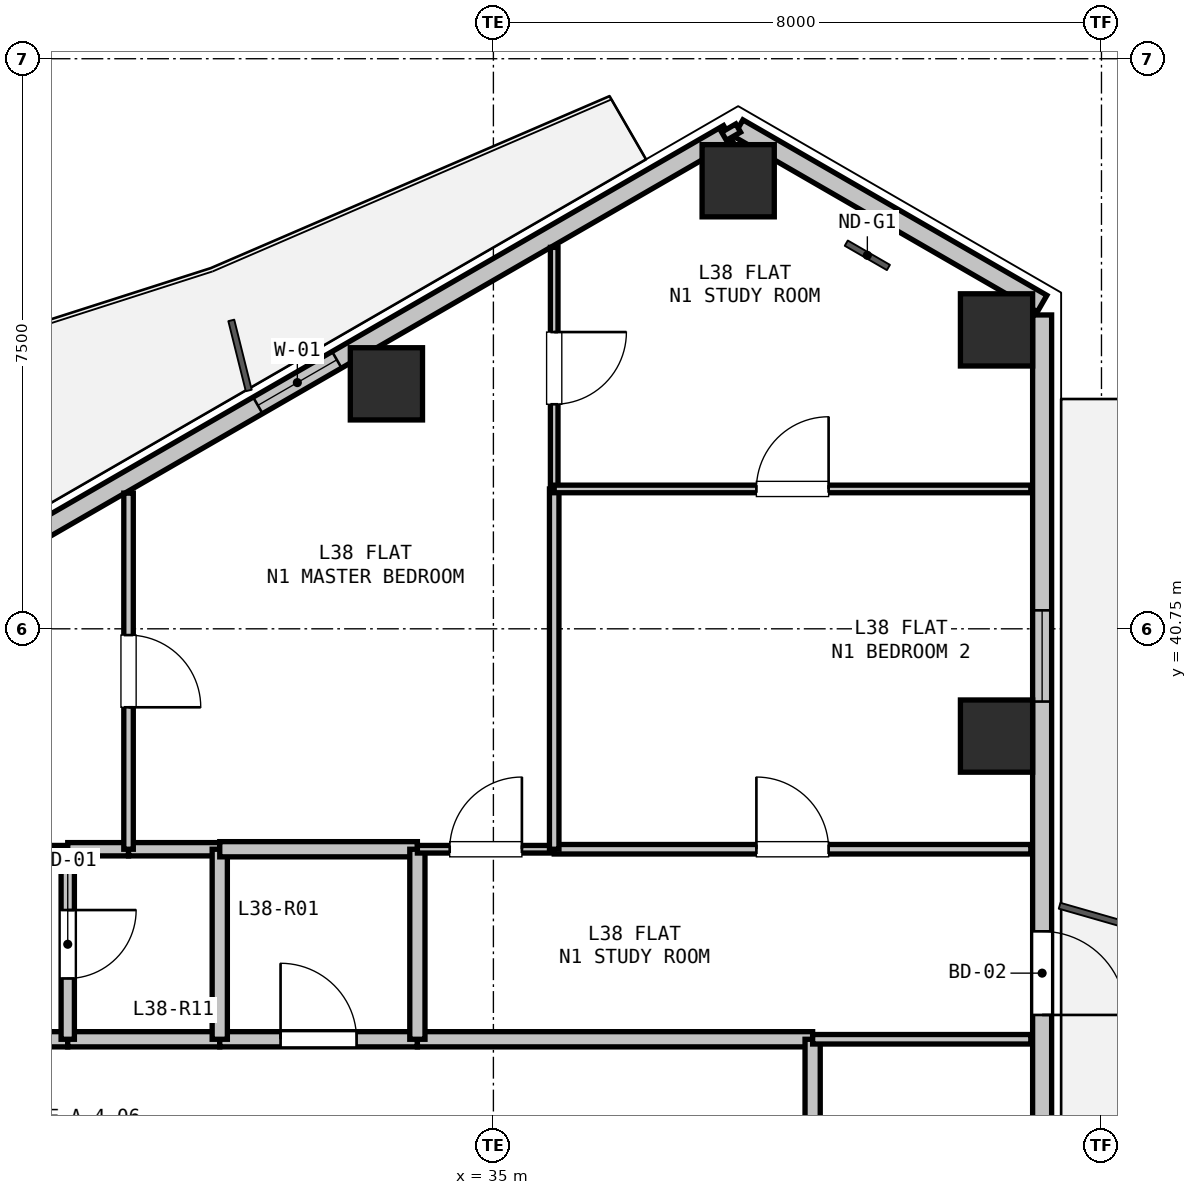
"""IFC4 building model, lengths in metres.
Left out: names, types, materials, properties, quantities, classifications, styles, units other than length and angle.
Written with IfcOpenShell. Run it as: python <this file> out.ifc"""

import sys

from ifc_helpers import new_model, si_unit, direction, frame, frame_2d, origin, origin_2d, place, context, subcontext, project, spatial, rectangle, hollow_rectangle, extrude, element, fill, save


model = new_model("IFC4")
c1 = context("Model", 3, precision=1e-05, world=origin(), true_north=direction((0.0, 1.0)))
c2 = subcontext(c1, "Body", "Model", "MODEL_VIEW")
j1 = project(units=[si_unit("LENGTHUNIT", "METRE"), si_unit("PLANEANGLEUNIT", "RADIAN")], contexts=[c1])
p1 = place(None, origin())
s1 = spatial("IfcSite", under=j1, at=p1, CompositionType="ELEMENT")
p2 = place(p1, origin())
s2 = spatial("IfcBuilding", under=s1, at=p2, CompositionType="ELEMENT")
p3 = place(p2, frame((0.0, 0.0, 137.7)))
s3 = spatial("IfcBuildingStorey", under=s2, at=p3, CompositionType="ELEMENT", Elevation=137.7)
for number, where, z_axis, x_axis in (
    (1, (33.593, 43.973, 0.0), (0.0, 0.0, 1.0), (1.0, 0.0, 0.0)),
    (2, (38.22, 46.645, 0.0), (0.0, 0.0, 1.0), (1.0, 0.0, 0.0)),
    (3, (41.619, 44.683, 0.0), (0.0, 0.0, 1.0), (1.0, 0.0, 0.0)),
    (4, (41.619, 39.339, 0.0), (0.0, 0.0, 1.0), (1.0, 0.0, 0.0)),
):
    element("IfcColumn", number, at=place(p3, frame(where, z_axis=z_axis, x_axis=x_axis)), inside=s3, PredefinedType="COLUMN", context=c2, shape_type="SweptSolid", body=[
        extrude(hollow_rectangle(XDim=0.95, YDim=0.95, WallThickness=0.028, at=origin_2d()), origin(), (0.0, 0.0, 1.0), 3.3),
    ])
p4 = place(p3, frame((38.22, 47.338, 0.0), z_axis=(0.0, 0.0, 1.0), x_axis=(0.866035021055, -0.499983342029, 0.0)))
e5 = element("IfcWall", 5, at=p4, inside=s3, PredefinedType="SOLIDWALL", context=c2, shape_type="SweptSolid", body=[
    extrude(rectangle(XDim=4.617, YDim=0.25, at=frame_2d((2.309, 0.0))), origin(), (0.0, 0.0, 1.0), 2.68),
])
p5 = place(p3, frame((28.403, 41.67, 0.0), z_axis=(0.0, 0.0, 1.0), x_axis=(0.86602239209, 0.500005216371, 0.0)))
e6 = element("IfcWall", 6, at=p5, inside=s3, PredefinedType="SOLIDWALL", context=c2, shape_type="SweptSolid", body=[
    extrude(rectangle(XDim=11.186, YDim=0.25, at=frame_2d((5.593, 0.0))), origin(), (0.0, 0.0, 1.0), 2.68),
])
p6 = place(p5, frame((4.039, 0.0, 0.9)))
e7 = element("IfcOpeningElement", 7, at=p6, cuts=e6, PredefinedType="OPENING", context=c2, shape_type="SweptSolid", body=[
    extrude(rectangle(XDim=1.2, YDim=1.4, at=frame_2d((0.6, 0.7))), frame((0.0, 0.135, 0.0), z_axis=(0.0, -1.0, 0.0), x_axis=(1.0, 0.0, 0.0)), (0.0, 0.0, 1.0), 0.27),
])
p7 = place(p3, frame((42.219, 44.879, 0.0), z_axis=(0.0, 0.0, 1.0), x_axis=(0.0, -1.0, 0.0)))
e8 = element("IfcWall", 8, at=p7, inside=s3, PredefinedType="SOLIDWALL", context=c2, shape_type="SweptSolid", body=[
    extrude(rectangle(XDim=11.186, YDim=0.25, at=frame_2d((5.593, 0.0))), origin(), (0.0, 0.0, 1.0), 2.68),
])
p8 = place(p7, frame((8.109, 0.0, 0.0)))
e9 = element("IfcOpeningElement", 9, at=p8, cuts=e8, PredefinedType="OPENING", context=c2, shape_type="SweptSolid", body=[
    extrude(rectangle(XDim=1.1, YDim=2.1, at=frame_2d((0.55, 1.05))), frame((0.0, 0.135, 0.0), z_axis=(0.0, -1.0, 0.0), x_axis=(1.0, 0.0, 0.0)), (0.0, 0.0, 1.0), 0.27),
])
p9 = place(p7, frame((3.886, 0.0, 0.9)))
e10 = element("IfcOpeningElement", 10, at=p9, cuts=e8, PredefinedType="OPENING", context=c2, shape_type="SweptSolid", body=[
    extrude(rectangle(XDim=1.2, YDim=1.4, at=frame_2d((0.6, 0.7))), frame((0.0, 0.135, 0.0), z_axis=(0.0, -1.0, 0.0), x_axis=(1.0, 0.0, 0.0)), (0.0, 0.0, 1.0), 0.27),
])
p10 = place(p3, frame((26.8, 35.35, 0.0), z_axis=(0.0, 0.0, 1.0), x_axis=(1.0, 0.0, 0.0)))
e11 = element("IfcWall", 11, at=p10, inside=s3, PredefinedType="PARTITIONING", context=c2, shape_type="SweptSolid", body=[
    extrude(rectangle(XDim=2.6, YDim=0.2, at=frame_2d((1.3, 0.0))), origin(), (0.0, 0.0, 1.0), 3.06),
])
p11 = place(p10, frame((0.8, 0.0, 0.0)))
e12 = element("IfcOpeningElement", 12, at=p11, cuts=e11, PredefinedType="OPENING", context=c2, shape_type="SweptSolid", body=[
    extrude(rectangle(XDim=1.0, YDim=2.15, at=frame_2d((0.5, 1.075))), frame((0.0, 0.11, 0.0), z_axis=(0.0, -1.0, 0.0), x_axis=(1.0, 0.0, 0.0)), (0.0, 0.0, 1.0), 0.22),
])
p12 = place(p3, frame((29.4, 35.35, 0.0), z_axis=(0.0, 0.0, 1.0), x_axis=(1.0, 0.0, 0.0)))
e13 = element("IfcWall", 13, at=p12, inside=s3, PredefinedType="PARTITIONING", context=c2, shape_type="SweptSolid", body=[
    extrude(rectangle(XDim=2.0, YDim=0.2, at=frame_2d((1.0, 0.0))), origin(), (0.0, 0.0, 1.0), 3.06),
])
p13 = place(p3, frame((31.4, 35.35, 0.0), z_axis=(0.0, 0.0, 1.0), x_axis=(1.0, 0.0, 0.0)))
e14 = element("IfcWall", 14, at=p13, inside=s3, PredefinedType="PARTITIONING", context=c2, shape_type="SweptSolid", body=[
    extrude(rectangle(XDim=2.6, YDim=0.2, at=frame_2d((1.3, 0.0))), origin(), (0.0, 0.0, 1.0), 3.06),
])
p14 = place(p13, frame((0.8, 0.0, 0.0)))
e15 = element("IfcOpeningElement", 15, at=p14, cuts=e14, PredefinedType="OPENING", context=c2, shape_type="SweptSolid", body=[
    extrude(rectangle(XDim=1.0, YDim=2.15, at=frame_2d((0.5, 1.075))), frame((0.0, 0.11, 0.0), z_axis=(0.0, -1.0, 0.0), x_axis=(1.0, 0.0, 0.0)), (0.0, 0.0, 1.0), 0.22),
])
p15 = place(p3, frame((34.0, 35.35, 0.0), z_axis=(0.0, 0.0, 1.0), x_axis=(1.0, 0.0, 0.0)))
e16 = element("IfcWall", 16, at=p15, inside=s3, PredefinedType="PARTITIONING", context=c2, shape_type="SweptSolid", body=[
    extrude(rectangle(XDim=5.2, YDim=0.2, at=frame_2d((2.6, 0.0))), origin(), (0.0, 0.0, 1.0), 2.433),
])
p16 = place(p3, frame((39.2, 35.35, 0.0), z_axis=(0.0, 0.0, 1.0), x_axis=(0.0, -1.0, 0.0)))
e17 = element("IfcWall", 17, at=p16, inside=s3, PredefinedType="PARTITIONING", context=c2, shape_type="SweptSolid", body=[
    extrude(rectangle(XDim=1.75, YDim=0.2, at=frame_2d((0.875, 0.0))), origin(), (0.0, 0.0, 1.0), 3.06),
])
p17 = place(p3, frame((26.8, 37.85, 0.0), z_axis=(0.0, 0.0, 1.0), x_axis=(1.0, 0.0, 0.0)))
e18 = element("IfcWall", 18, at=p17, inside=s3, PredefinedType="PARTITIONING", context=c2, shape_type="SweptSolid", body=[
    extrude(rectangle(XDim=2.6, YDim=0.1, at=frame_2d((1.3, 0.0))), origin(), (0.0, 0.0, 1.0), 3.06),
])
p18 = place(p17, frame((0.825, 0.0, 0.0)))
e19 = element("IfcOpeningElement", 19, at=p18, cuts=e18, PredefinedType="OPENING", context=c2, shape_type="SweptSolid", body=[
    extrude(rectangle(XDim=0.95, YDim=2.1, at=frame_2d((0.475, 1.05))), frame((0.0, 0.06, 0.0), z_axis=(0.0, -1.0, 0.0), x_axis=(1.0, 0.0, 0.0)), (0.0, 0.0, 1.0), 0.12),
])
p19 = place(p3, frame((29.4, 37.85, 0.0), z_axis=(0.0, 0.0, 1.0), x_axis=(0.0, -1.0, 0.0)))
e20 = element("IfcWall", 20, at=p19, inside=s3, PredefinedType="PLUMBINGWALL", context=c2, shape_type="SweptSolid", body=[
    extrude(rectangle(XDim=2.5, YDim=0.175, at=frame_2d((1.25, 0.0))), origin(), (0.0, 0.0, 1.0), 3.06),
])
p20 = place(p19, frame((0.8, 0.0, 0.0)))
e21 = element("IfcOpeningElement", 21, at=p20, cuts=e20, PredefinedType="OPENING", context=c2, shape_type="SweptSolid", body=[
    extrude(rectangle(XDim=0.9, YDim=2.1, at=frame_2d((0.45, 1.05))), frame((0.0, 0.097, 0.0), z_axis=(0.0, -1.0, 0.0), x_axis=(1.0, 0.0, 0.0)), (0.0, 0.0, 1.0), 0.195),
])
p21 = place(p3, frame((29.4, 37.85, 0.0), z_axis=(0.0, 0.0, 1.0), x_axis=(1.0, 0.0, 0.0)))
e22 = element("IfcWall", 22, at=p21, inside=s3, PredefinedType="PLUMBINGWALL", context=c2, shape_type="SweptSolid", body=[
    extrude(rectangle(XDim=0.8, YDim=0.175, at=frame_2d((0.4, 0.0))), origin(), (0.0, 0.0, 1.0), 3.06),
])
p22 = place(p3, frame((30.2, 37.85, 0.0), z_axis=(0.0, 0.0, 1.0), x_axis=(1.0, 0.0, 0.0)))
e23 = element("IfcWall", 23, at=p22, inside=s3, PredefinedType="PLUMBINGWALL", context=c2, shape_type="SweptSolid", body=[
    extrude(rectangle(XDim=1.2, YDim=0.175, at=frame_2d((0.6, 0.0))), origin(), (0.0, 0.0, 1.0), 3.06),
])
p23 = place(p3, frame((31.4, 37.85, 0.0), z_axis=(0.0, 0.0, 1.0), x_axis=(0.0, -1.0, 0.0)))
e24 = element("IfcWall", 24, at=p23, inside=s3, PredefinedType="PARTITIONING", context=c2, shape_type="SweptSolid", body=[
    extrude(rectangle(XDim=2.5, YDim=0.2, at=frame_2d((1.25, 0.0))), origin(), (0.0, 0.0, 1.0), 3.06),
])
p24 = place(p3, frame((31.4, 37.85, 0.0), z_axis=(0.0, 0.0, 1.0), x_axis=(1.0, 0.0, 0.0)))
e25 = element("IfcWall", 25, at=p24, inside=s3, PredefinedType="PARTITIONING", context=c2, shape_type="SweptSolid", body=[
    extrude(rectangle(XDim=2.6, YDim=0.2, at=frame_2d((1.3, 0.0))), origin(), (0.0, 0.0, 1.0), 3.06),
])
p25 = place(p3, frame((34.0, 37.85, 0.0), z_axis=(0.0, 0.0, 1.0), x_axis=(0.0, -1.0, 0.0)))
e26 = element("IfcWall", 26, at=p25, inside=s3, PredefinedType="PARTITIONING", context=c2, shape_type="SweptSolid", body=[
    extrude(rectangle(XDim=2.5, YDim=0.2, at=frame_2d((1.25, 0.0))), origin(), (0.0, 0.0, 1.0), 3.06),
])
p26 = place(p3, frame((42.07, 35.35, 0.0), z_axis=(0.0, 0.0, 1.0), x_axis=(-1.0, 0.0, 0.0)))
e27 = element("IfcWall", 27, at=p26, inside=s3, PredefinedType="PARTITIONING", context=c2, shape_type="SweptSolid", body=[
    extrude(rectangle(XDim=2.87, YDim=0.125, at=frame_2d((1.435, 0.0))), origin(), (0.0, 0.0, 1.0), 2.365),
])
p27 = place(p3, frame((34.0, 37.85, 0.0), z_axis=(0.0, 0.0, 1.0), x_axis=(1.0, 0.0, 0.0)))
e28 = element("IfcWall", 28, at=p27, inside=s3, PredefinedType="PARTITIONING", context=c2, shape_type="SweptSolid", body=[
    extrude(rectangle(XDim=1.8, YDim=0.1, at=frame_2d((0.9, 0.0))), origin(), (0.0, 0.0, 1.0), 3.06),
])
p28 = place(p27, frame((0.425, 0.0, 0.0)))
e29 = element("IfcOpeningElement", 29, at=p28, cuts=e28, PredefinedType="OPENING", context=c2, shape_type="SweptSolid", body=[
    extrude(rectangle(XDim=0.95, YDim=2.1, at=frame_2d((0.475, 1.05))), frame((0.0, 0.06, 0.0), z_axis=(0.0, -1.0, 0.0), x_axis=(1.0, 0.0, 0.0)), (0.0, 0.0, 1.0), 0.12),
])
p29 = place(p3, frame((35.8, 37.85, 0.0), z_axis=(0.0, 0.0, 1.0), x_axis=(1.0, 0.0, 0.0)))
e30 = element("IfcWall", 30, at=p29, inside=s3, PredefinedType="PARTITIONING", context=c2, shape_type="SweptSolid", body=[
    extrude(rectangle(XDim=6.27, YDim=0.125, at=frame_2d((3.135, 0.0))), origin(), (0.0, 0.0, 1.0), 2.365),
])
p30 = place(p29, frame((2.66, 0.0, 0.0)))
e31 = element("IfcOpeningElement", 31, at=p30, cuts=e30, PredefinedType="OPENING", context=c2, shape_type="SweptSolid", body=[
    extrude(rectangle(XDim=0.95, YDim=2.1, at=frame_2d((0.475, 1.05))), frame((0.0, 0.073, 0.0), z_axis=(0.0, -1.0, 0.0), x_axis=(1.0, 0.0, 0.0)), (0.0, 0.0, 1.0), 0.145),
])
p31 = place(p3, frame((30.2, 42.535, 0.0), z_axis=(0.0, 0.0, 1.0), x_axis=(0.0, -1.0, 0.0)))
e32 = element("IfcWall", 32, at=p31, inside=s3, PredefinedType="PARTITIONING", context=c2, shape_type="SweptSolid", body=[
    extrude(rectangle(XDim=4.685, YDim=0.125, at=frame_2d((2.342, 0.0))), origin(), (0.0, 0.0, 1.0), 2.365),
])
p32 = place(p31, frame((1.867, 0.0, 0.0)))
e33 = element("IfcOpeningElement", 33, at=p32, cuts=e32, PredefinedType="OPENING", context=c2, shape_type="SweptSolid", body=[
    extrude(rectangle(XDim=0.95, YDim=2.1, at=frame_2d((0.475, 1.05))), frame((0.0, 0.073, 0.0), z_axis=(0.0, -1.0, 0.0), x_axis=(1.0, 0.0, 0.0)), (0.0, 0.0, 1.0), 0.145),
])
p33 = place(p3, frame((35.8, 45.768, 0.0), z_axis=(0.0, 0.0, 1.0), x_axis=(0.0, -1.0, 0.0)))
e34 = element("IfcWall", 34, at=p33, inside=s3, PredefinedType="PARTITIONING", context=c2, shape_type="SweptSolid", body=[
    extrude(rectangle(XDim=3.178, YDim=0.1, at=frame_2d((1.589, 0.0))), origin(), (0.0, 0.0, 1.0), 2.725),
])
p34 = place(p33, frame((1.114, 0.0, 0.0)))
e35 = element("IfcOpeningElement", 35, at=p34, cuts=e34, PredefinedType="OPENING", context=c2, shape_type="SweptSolid", body=[
    extrude(rectangle(XDim=0.95, YDim=2.1, at=frame_2d((0.475, 1.05))), frame((0.0, 0.06, 0.0), z_axis=(0.0, -1.0, 0.0), x_axis=(1.0, 0.0, 0.0)), (0.0, 0.0, 1.0), 0.12),
])
p35 = place(p3, frame((35.8, 42.59, 0.0), z_axis=(0.0, 0.0, 1.0), x_axis=(0.0, -1.0, 0.0)))
e36 = element("IfcWall", 36, at=p35, inside=s3, PredefinedType="PARTITIONING", context=c2, shape_type="SweptSolid", body=[
    extrude(rectangle(XDim=4.74, YDim=0.125, at=frame_2d((2.37, 0.0))), origin(), (0.0, 0.0, 1.0), 3.06),
])
p36 = place(p3, frame((35.8, 42.59, 0.0), z_axis=(0.0, 0.0, 1.0), x_axis=(1.0, 0.0, 0.0)))
e37 = element("IfcWall", 37, at=p36, inside=s3, PredefinedType="PARTITIONING", context=c2, shape_type="SweptSolid", body=[
    extrude(rectangle(XDim=6.27, YDim=0.1, at=frame_2d((3.135, 0.0))), origin(), (0.0, 0.0, 1.0), 2.433),
])
p37 = place(p36, frame((2.66, 0.0, 0.0)))
e38 = element("IfcOpeningElement", 38, at=p37, cuts=e37, PredefinedType="OPENING", context=c2, shape_type="SweptSolid", body=[
    extrude(rectangle(XDim=0.95, YDim=2.1, at=frame_2d((0.475, 1.05))), frame((0.0, 0.06, 0.0), z_axis=(0.0, -1.0, 0.0), x_axis=(1.0, 0.0, 0.0)), (0.0, 0.0, 1.0), 0.12),
])
p38 = place(p3, frame((38.034, 47.23, 0.0), z_axis=(0.0, 0.0, 1.0), x_axis=(0.865581379588, 0.500768285049, 0.0)))
e39 = element("IfcWall", 39, at=p38, inside=s3, PredefinedType="PARTITIONING", context=c2, shape_type="SweptSolid", body=[
    extrude(rectangle(XDim=0.216, YDim=0.125, at=frame_2d((0.108, 0.0))), origin(), (0.0, 0.0, 1.0), 3.06),
])
p39 = place(p6, origin())
e40 = element("IfcWindow", 40, at=p39, inside=s3, PartitioningType="SINGLE_PANEL", PredefinedType="WINDOW", context=c2, shape_type="SweptSolid", body=[
    extrude(rectangle(XDim=1.2, YDim=1.4, at=frame_2d((0.6, 0.7))), frame((0.0, 0.03, 0.0), z_axis=(0.0, -1.0, 0.0), x_axis=(1.0, 0.0, 0.0)), (0.0, 0.0, 1.0), 0.06),
])
fill(e7, e40)
p40 = place(p8, origin())
e41 = element("IfcDoor", 41, at=p40, inside=s3, OperationType="SINGLE_SWING_RIGHT", PredefinedType="DOOR", context=c2, shape_type="SweptSolid", body=[
    extrude(rectangle(XDim=1.1, YDim=2.1, at=frame_2d((0.55, 1.05))), frame((0.0, 0.025, 0.0), z_axis=(0.0, -1.0, 0.0), x_axis=(1.0, 0.0, 0.0)), (0.0, 0.0, 1.0), 0.05),
])
fill(e9, e41)
p41 = place(p9, origin())
e42 = element("IfcWindow", 42, at=p41, inside=s3, PartitioningType="SINGLE_PANEL", PredefinedType="WINDOW", context=c2, shape_type="SweptSolid", body=[
    extrude(rectangle(XDim=1.2, YDim=1.4, at=frame_2d((0.6, 0.7))), frame((0.0, 0.03, 0.0), z_axis=(0.0, -1.0, 0.0), x_axis=(1.0, 0.0, 0.0)), (0.0, 0.0, 1.0), 0.06),
])
fill(e10, e42)
p42 = place(p14, origin())
e43 = element("IfcDoor", 43, at=p42, inside=s3, OperationType="SINGLE_SWING_LEFT", PredefinedType="DOOR", context=c2, shape_type="SweptSolid", body=[
    extrude(rectangle(XDim=1.0, YDim=2.15, at=frame_2d((0.5, 1.075))), frame((0.0, 0.025, 0.0), z_axis=(0.0, -1.0, 0.0), x_axis=(1.0, 0.0, 0.0)), (0.0, 0.0, 1.0), 0.05),
])
fill(e15, e43)
p43 = place(p20, origin())
e44 = element("IfcDoor", 44, at=p43, inside=s3, OperationType="SINGLE_SWING_LEFT", PredefinedType="DOOR", context=c2, shape_type="SweptSolid", body=[
    extrude(rectangle(XDim=0.9, YDim=2.1, at=frame_2d((0.45, 1.05))), frame((0.0, 0.025, 0.0), z_axis=(0.0, -1.0, 0.0), x_axis=(1.0, 0.0, 0.0)), (0.0, 0.0, 1.0), 0.05),
])
fill(e21, e44)
p44 = place(p28, origin())
e45 = element("IfcDoor", 45, at=p44, inside=s3, OperationType="SINGLE_SWING_RIGHT", PredefinedType="DOOR", context=c2, shape_type="SweptSolid", body=[
    extrude(rectangle(XDim=0.95, YDim=2.1, at=frame_2d((0.475, 1.05))), frame((0.0, 0.025, 0.0), z_axis=(0.0, -1.0, 0.0), x_axis=(1.0, 0.0, 0.0)), (0.0, 0.0, 1.0), 0.05),
])
fill(e29, e45)
p45 = place(p30, origin())
e46 = element("IfcDoor", 46, at=p45, inside=s3, OperationType="SINGLE_SWING_LEFT", PredefinedType="DOOR", context=c2, shape_type="SweptSolid", body=[
    extrude(rectangle(XDim=0.95, YDim=2.1, at=frame_2d((0.475, 1.05))), frame((0.0, 0.025, 0.0), z_axis=(0.0, -1.0, 0.0), x_axis=(1.0, 0.0, 0.0)), (0.0, 0.0, 1.0), 0.05),
])
fill(e31, e46)
p46 = place(p32, origin())
e47 = element("IfcDoor", 47, at=p46, inside=s3, OperationType="SINGLE_SWING_RIGHT", PredefinedType="DOOR", context=c2, shape_type="SweptSolid", body=[
    extrude(rectangle(XDim=0.95, YDim=2.1, at=frame_2d((0.475, 1.05))), frame((0.0, 0.025, 0.0), z_axis=(0.0, -1.0, 0.0), x_axis=(1.0, 0.0, 0.0)), (0.0, 0.0, 1.0), 0.05),
])
fill(e33, e47)
p47 = place(p34, origin())
e48 = element("IfcDoor", 48, at=p47, inside=s3, OperationType="SINGLE_SWING_LEFT", PredefinedType="DOOR", context=c2, shape_type="SweptSolid", body=[
    extrude(rectangle(XDim=0.95, YDim=2.1, at=frame_2d((0.475, 1.05))), frame((0.0, 0.025, 0.0), z_axis=(0.0, -1.0, 0.0), x_axis=(1.0, 0.0, 0.0)), (0.0, 0.0, 1.0), 0.05),
])
fill(e35, e48)
p48 = place(p37, origin())
e49 = element("IfcDoor", 49, at=p48, inside=s3, OperationType="SINGLE_SWING_RIGHT", PredefinedType="DOOR", context=c2, shape_type="SweptSolid", body=[
    extrude(rectangle(XDim=0.95, YDim=2.1, at=frame_2d((0.475, 1.05))), frame((0.0, 0.025, 0.0), z_axis=(0.0, -1.0, 0.0), x_axis=(1.0, 0.0, 0.0)), (0.0, 0.0, 1.0), 0.05),
])
fill(e38, e49)
save(model, sys.argv[1])
